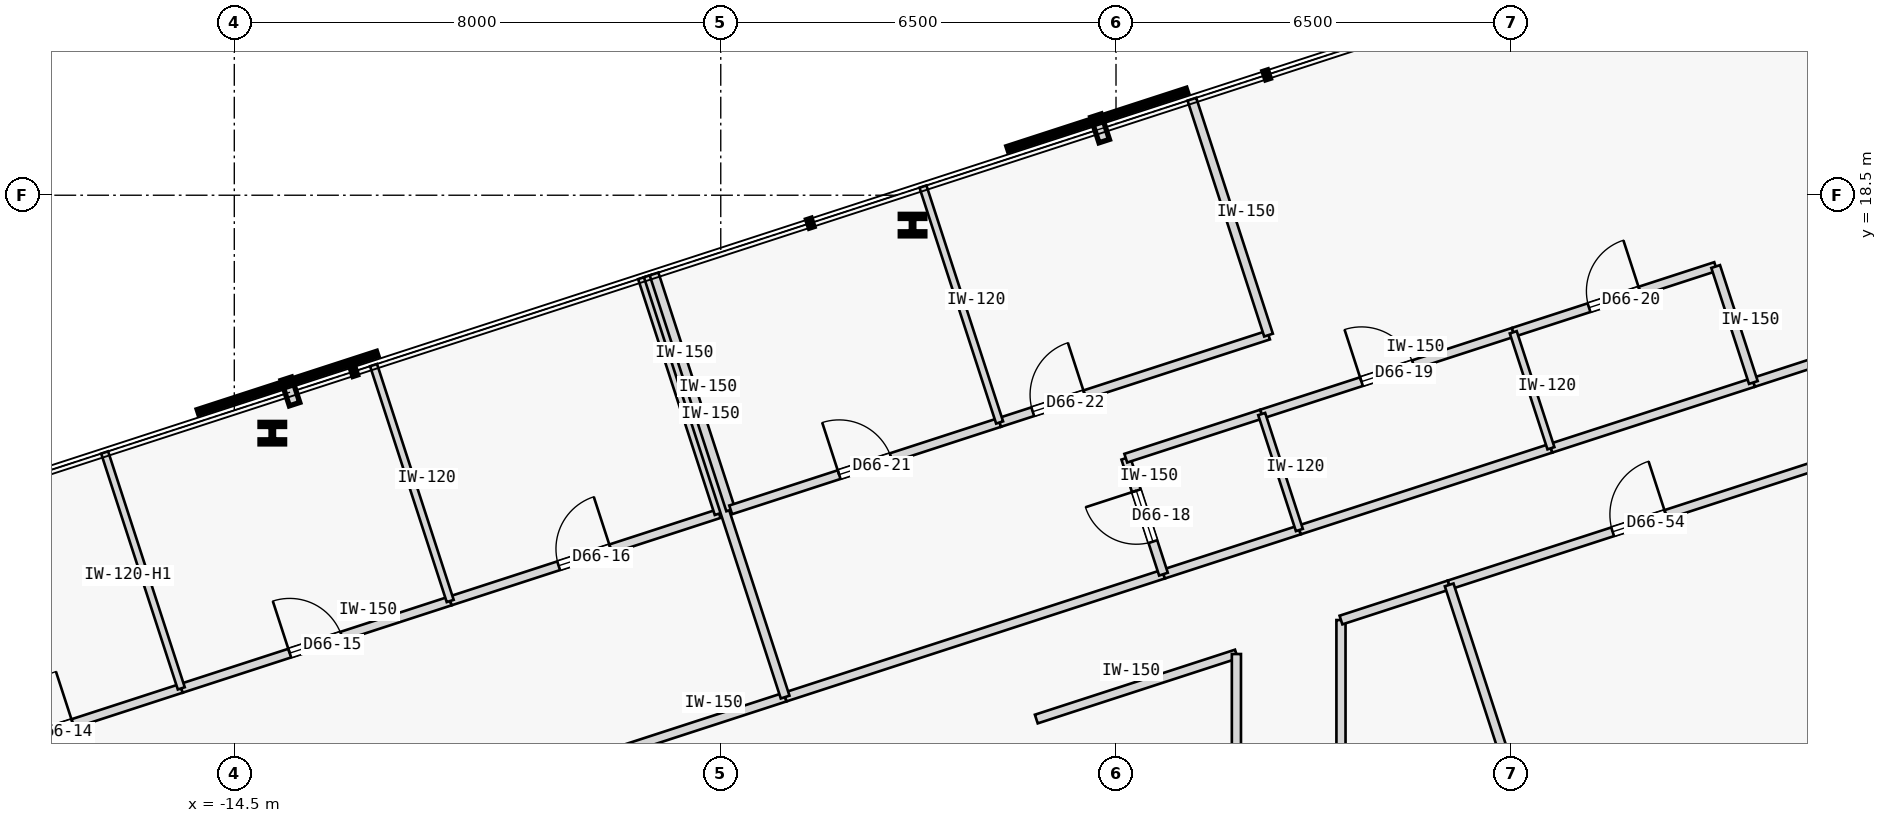
"""IFC4 building model, lengths in metres.
Left out: names, types, materials, properties, quantities, classifications, styles, units other than length and angle.
Written with IfcOpenShell. Run it as: python <this file> out.ifc"""

import sys

from ifc_helpers import new_model, si_unit, direction, frame, frame_2d, origin, origin_2d, place, context, subcontext, project, spatial, rectangle, i_section, extrude, element, fill, save


model = new_model("IFC4")
c1 = context("Model", 3, precision=1e-05, world=origin(), true_north=direction((0.0, 1.0)))
c2 = subcontext(c1, "Body", "Model", "MODEL_VIEW")
j1 = project(units=[si_unit("LENGTHUNIT", "METRE"), si_unit("PLANEANGLEUNIT", "RADIAN")], contexts=[c1])
p1 = place(None, origin())
s1 = spatial("IfcSite", under=j1, at=p1, CompositionType="ELEMENT")
p2 = place(p1, origin())
s2 = spatial("IfcBuilding", under=s1, at=p2, CompositionType="ELEMENT")
p3 = place(p2, frame((0.0, 0.0, 247.75)))
s3 = spatial("IfcBuildingStorey", under=s2, at=p3, CompositionType="ELEMENT", Elevation=247.75)
for number, where, z_axis, x_axis in (
    (1, (-3.346, 18.009, 0.0), (0.0, 0.0, 1.0), (1.0, 0.0, 0.0)),
    (2, (-13.875, 14.587, 0.0), (0.0, 0.0, 1.0), (1.0, 0.0, 0.0)),
):
    element("IfcColumn", number, at=place(p3, frame(where, z_axis=z_axis, x_axis=x_axis)), inside=s3, PredefinedType="COLUMN", context=c2, shape_type="SweptSolid", body=[
        extrude(i_section(OverallWidth=0.405, OverallDepth=0.355, WebThickness=0.042, FlangeThickness=0.068, FilletRadius=0.015, at=origin_2d()), origin(), (0.0, 0.0, 1.0), 3.35),
    ])
p4 = place(p3, frame((-19.497, 5.68, 0.0), z_axis=(0.0, 0.0, 1.0), x_axis=(0.95105300492, 0.309027801067, 0.0)))
e3 = element("IfcWall", 3, at=p4, inside=s3, PredefinedType="PARTITIONING", context=c2, shape_type="SweptSolid", body=[
    extrude(rectangle(XDim=14.779, YDim=0.15, at=frame_2d((7.39, 0.0))), origin(), (0.0, 0.0, 1.0), 3.125),
])
p5 = place(p4, frame((6.915, 0.0, 0.0)))
e4 = element("IfcOpeningElement", 4, at=p5, cuts=e3, PredefinedType="OPENING", context=c2, shape_type="SweptSolid", body=[
    extrude(rectangle(XDim=0.95, YDim=2.15, at=frame_2d((0.475, 1.075))), frame((0.0, 0.085, 0.0), z_axis=(0.0, -1.0, 0.0), x_axis=(1.0, 0.0, 0.0)), (0.0, 0.0, 1.0), 0.17),
])
p6 = place(p3, frame((-5.441, 10.247, 0.0), z_axis=(0.0, 0.0, 1.0), x_axis=(0.951062860421, 0.308997468483, 0.0)))
e5 = element("IfcWall", 5, at=p6, inside=s3, PredefinedType="PARTITIONING", context=c2, shape_type="SweptSolid", body=[
    extrude(rectangle(XDim=6.542, YDim=0.15, at=frame_2d((3.271, 0.0))), origin(), (0.0, 0.0, 1.0), 3.125),
])
p7 = place(p3, frame((10.481, 15.421, 0.0), z_axis=(0.0, 0.0, 1.0), x_axis=(0.951055682471, 0.30901956061, 0.0)))
e6 = element("IfcWall", 6, at=p7, inside=s3, PredefinedType="PARTITIONING", context=c2, shape_type="SweptSolid", body=[
    extrude(rectangle(XDim=13.114, YDim=0.15, at=frame_2d((6.557, 0.0))), origin(), (0.0, 0.0, 1.0), 3.125),
])
p8 = place(p7, frame((6.082, 0.0, 0.0)))
e7 = element("IfcOpeningElement", 7, at=p8, cuts=e6, PredefinedType="OPENING", context=c2, shape_type="SweptSolid", body=[
    extrude(rectangle(XDim=0.95, YDim=2.15, at=frame_2d((0.475, 1.075))), frame((0.0, 0.085, 0.0), z_axis=(0.0, -1.0, 0.0), x_axis=(1.0, 0.0, 0.0)), (0.0, 0.0, 1.0), 0.17),
])
p9 = place(p3, frame((0.781, 12.269, 0.0), z_axis=(0.0, 0.0, 1.0), x_axis=(0.951066131077, 0.308987401554, 0.0)))
e8 = element("IfcWall", 8, at=p9, inside=s3, PredefinedType="PARTITIONING", context=c2, shape_type="SweptSolid", body=[
    extrude(rectangle(XDim=2.35, YDim=0.15, at=frame_2d((1.175, 0.0))), origin(), (0.0, 0.0, 1.0), 3.125),
])
p10 = place(p3, frame((3.015, 12.995, 0.0), z_axis=(0.0, 0.0, 1.0), x_axis=(0.951052627573, 0.309028962374, 0.0)))
e9 = element("IfcWall", 9, at=p10, inside=s3, PredefinedType="PARTITIONING", context=c2, shape_type="SweptSolid", body=[
    extrude(rectangle(XDim=4.35, YDim=0.15, at=frame_2d((2.175, 0.0))), origin(), (0.0, 0.0, 1.0), 3.125),
])
p11 = place(p3, frame((7.152, 14.339, 0.0), z_axis=(0.0, 0.0, 1.0), x_axis=(0.951062257173, 0.308999325213, 0.0)))
e10 = element("IfcWall", 10, at=p11, inside=s3, PredefinedType="PARTITIONING", context=c2, shape_type="SweptSolid", body=[
    extrude(rectangle(XDim=3.5, YDim=0.15, at=frame_2d((1.75, 0.0))), origin(), (0.0, 0.0, 1.0), 3.125),
])
p12 = place(p3, frame((3.7, 5.6, 0.0), z_axis=(0.0, 0.0, 1.0), x_axis=(-0.000123839008, 0.999999992332, 0.0)))
e11 = element("IfcWall", 11, at=p12, inside=s3, PredefinedType="PARTITIONING", context=c2, shape_type="SweptSolid", body=[
    extrude(rectangle(XDim=5.914, YDim=0.15, at=frame_2d((2.957, 0.0))), origin(), (0.0, 0.0, 1.0), 2.675),
])
p13 = place(p12, frame((2.497, 0.0, 0.0)))
e12 = element("IfcOpeningElement", 12, at=p13, cuts=e11, PredefinedType="OPENING", context=c2, shape_type="SweptSolid", body=[
    extrude(rectangle(XDim=0.92, YDim=2.15, at=frame_2d((0.46, 1.075))), frame((0.0, 0.085, 0.0), z_axis=(0.0, -1.0, 0.0), x_axis=(1.0, 0.0, 0.0)), (0.0, 0.0, 1.0), 0.17),
])
p14 = place(p3, frame((3.699, 11.514, 0.0), z_axis=(0.0, 0.0, 1.0), x_axis=(0.951069540665, 0.308976906612, 0.0)))
e13 = element("IfcWall", 13, at=p14, inside=s3, PredefinedType="PARTITIONING", context=c2, shape_type="SweptSolid", body=[
    extrude(rectangle(XDim=1.871, YDim=0.15, at=frame_2d((0.936, 0.0))), origin(), (0.0, 0.0, 1.0), 3.125),
])
p15 = place(p3, frame((5.479, 12.092, 0.0), z_axis=(0.0, 0.0, 1.0), x_axis=(0.951051809397, 0.309031480343, 0.0)))
e14 = element("IfcWall", 14, at=p15, inside=s3, PredefinedType="PARTITIONING", context=c2, shape_type="SweptSolid", body=[
    extrude(rectangle(XDim=6.573, YDim=0.15, at=frame_2d((3.287, 0.0))), origin(), (0.0, 0.0, 1.0), 3.125),
])
p16 = place(p15, frame((2.826, 0.0, 0.0)))
e15 = element("IfcOpeningElement", 15, at=p16, cuts=e14, PredefinedType="OPENING", context=c2, shape_type="SweptSolid", body=[
    extrude(rectangle(XDim=0.92, YDim=2.15, at=frame_2d((0.46, 1.075))), frame((0.0, 0.085, 0.0), z_axis=(0.0, -1.0, 0.0), x_axis=(1.0, 0.0, 0.0)), (0.0, 0.0, 1.0), 0.17),
])
p17 = place(p3, frame((-1.311, 9.886, 0.0), z_axis=(0.0, 0.0, 1.0), x_axis=(0.951068803905, 0.308979174442, 0.0)))
e16 = element("IfcWall", 16, at=p17, inside=s3, PredefinedType="PARTITIONING", context=c2, shape_type="SweptSolid", body=[
    extrude(rectangle(XDim=3.46, YDim=0.15, at=frame_2d((1.73, 0.0))), origin(), (0.0, 0.0, 1.0), 3.125),
])
p18 = place(p3, frame((1.98, 6.748, 0.0), z_axis=(0.0, 0.0, 1.0), x_axis=(0.0, 1.0, 0.0)))
e17 = element("IfcWall", 17, at=p18, inside=s3, PredefinedType="PARTITIONING", context=c2, shape_type="SweptSolid", body=[
    extrude(rectangle(XDim=4.207, YDim=0.15, at=frame_2d((2.104, 0.0))), origin(), (0.0, 0.0, 1.0), 2.675),
])
p19 = place(p18, frame((1.643, 0.0, 0.0)))
e18 = element("IfcOpeningElement", 18, at=p19, cuts=e17, PredefinedType="OPENING", context=c2, shape_type="SweptSolid", body=[
    extrude(rectangle(XDim=0.92, YDim=2.15, at=frame_2d((0.46, 1.075))), frame((0.0, 0.085, 0.0), z_axis=(0.0, -1.0, 0.0), x_axis=(1.0, 0.0, 0.0)), (0.0, 0.0, 1.0), 0.17),
])
p20 = place(p3, frame((-19.794, 8.954, 0.0), z_axis=(0.0, 0.0, 1.0), x_axis=(0.951065702951, 0.308988719326, 0.0)))
e19 = element("IfcWall", 19, at=p20, inside=s3, PredefinedType="PARTITIONING", context=c2, shape_type="SweptSolid", body=[
    extrude(rectangle(XDim=4.65, YDim=0.15, at=frame_2d((2.325, 0.0))), origin(), (0.0, 0.0, 1.0), 3.125),
])
p21 = place(p20, frame((1.875, 0.0, 0.0)))
e20 = element("IfcOpeningElement", 20, at=p21, cuts=e19, PredefinedType="OPENING", context=c2, shape_type="SweptSolid", body=[
    extrude(rectangle(XDim=0.9, YDim=2.15, at=frame_2d((0.45, 1.075))), frame((0.0, 0.085, 0.0), z_axis=(0.0, -1.0, 0.0), x_axis=(1.0, 0.0, 0.0)), (0.0, 0.0, 1.0), 0.17),
])
p22 = place(p3, frame((-15.372, 10.39, 0.0), z_axis=(0.0, 0.0, 1.0), x_axis=(0.951050272606, 0.309036209813, 0.0)))
e21 = element("IfcWall", 21, at=p22, inside=s3, PredefinedType="PARTITIONING", context=c2, shape_type="SweptSolid", body=[
    extrude(rectangle(XDim=4.65, YDim=0.15, at=frame_2d((2.325, 0.0))), origin(), (0.0, 0.0, 1.0), 3.125),
])
p23 = place(p22, frame((1.875, 0.0, 0.0)))
e22 = element("IfcOpeningElement", 22, at=p23, cuts=e21, PredefinedType="OPENING", context=c2, shape_type="SweptSolid", body=[
    extrude(rectangle(XDim=0.9, YDim=2.15, at=frame_2d((0.45, 1.075))), frame((0.0, 0.085, 0.0), z_axis=(0.0, -1.0, 0.0), x_axis=(1.0, 0.0, 0.0)), (0.0, 0.0, 1.0), 0.17),
])
p24 = place(p3, frame((-10.949, 11.827, 0.0), z_axis=(0.0, 0.0, 1.0), x_axis=(0.951050272606, 0.309036209813, 0.0)))
e23 = element("IfcWall", 23, at=p24, inside=s3, PredefinedType="PARTITIONING", context=c2, shape_type="SweptSolid", body=[
    extrude(rectangle(XDim=4.65, YDim=0.15, at=frame_2d((2.325, 0.0))), origin(), (0.0, 0.0, 1.0), 3.125),
])
p25 = place(p24, frame((1.875, 0.0, 0.0)))
e24 = element("IfcOpeningElement", 24, at=p25, cuts=e23, PredefinedType="OPENING", context=c2, shape_type="SweptSolid", body=[
    extrude(rectangle(XDim=0.9, YDim=2.15, at=frame_2d((0.45, 1.075))), frame((0.0, 0.085, 0.0), z_axis=(0.0, -1.0, 0.0), x_axis=(1.0, 0.0, 0.0)), (0.0, 0.0, 1.0), 0.17),
])
p26 = place(p3, frame((-6.527, 13.264, 0.0), z_axis=(0.0, 0.0, 1.0), x_axis=(-0.308964264858, 0.951073647538, 0.0)))
e25 = element("IfcWall", 25, at=p26, inside=s3, PredefinedType="PARTITIONING", context=c2, shape_type="SweptSolid", body=[
    extrude(rectangle(XDim=4.079, YDim=0.15, at=frame_2d((2.04, 0.0))), origin(), (0.0, 0.0, 1.0), 3.125),
])
p27 = place(p3, frame((-5.441, 10.247, 0.0), z_axis=(0.0, 0.0, 1.0), x_axis=(-0.309039081864, 0.951049339351, 0.0)))
e26 = element("IfcWall", 26, at=p27, inside=s3, PredefinedType="PARTITIONING", context=c2, shape_type="SweptSolid", body=[
    extrude(rectangle(XDim=7.284, YDim=0.15, at=frame_2d((3.642, 0.0))), origin(), (0.0, 0.0, 1.0), 3.125),
])
p28 = place(p3, frame((-15.372, 10.39, 0.0), z_axis=(0.0, 0.0, 1.0), x_axis=(-0.309000814064, 0.951061773445, 0.0)))
e27 = element("IfcWall", 27, at=p28, inside=s3, PredefinedType="PARTITIONING", context=c2, shape_type="SweptSolid", body=[
    extrude(rectangle(XDim=4.079, YDim=0.12, at=frame_2d((2.04, 0.0))), origin(), (0.0, 0.0, 1.0), 2.675),
])
p29 = place(p3, frame((-10.949, 11.827, 0.0), z_axis=(0.0, 0.0, 1.0), x_axis=(-0.308964264858, 0.951073647538, 0.0)))
e28 = element("IfcWall", 28, at=p29, inside=s3, PredefinedType="PARTITIONING", context=c2, shape_type="SweptSolid", body=[
    extrude(rectangle(XDim=4.079, YDim=0.12, at=frame_2d((2.04, 0.0))), origin(), (0.0, 0.0, 1.0), 3.125),
])
p30 = place(p3, frame((0.781, 12.269, 0.0), z_axis=(0.0, 0.0, 1.0), x_axis=(-0.309058537449, 0.951043017129, 0.0)))
e29 = element("IfcWall", 29, at=p30, inside=s3, PredefinedType="PARTITIONING", context=c2, shape_type="SweptSolid", body=[
    extrude(rectangle(XDim=2.005, YDim=0.15, at=frame_2d((1.002, 0.0))), origin(), (0.0, 0.0, 1.0), 3.125),
])
p31 = place(p30, frame((0.562, 0.0, 0.0)))
e30 = element("IfcOpeningElement", 30, at=p31, cuts=e29, PredefinedType="OPENING", context=c2, shape_type="SweptSolid", body=[
    extrude(rectangle(XDim=0.88, YDim=2.15, at=frame_2d((0.44, 1.075))), frame((0.0, 0.085, 0.0), z_axis=(0.0, -1.0, 0.0), x_axis=(1.0, 0.0, 0.0)), (0.0, 0.0, 1.0), 0.17),
])
p32 = place(p3, frame((0.161, 14.176, 0.0), z_axis=(0.0, 0.0, 1.0), x_axis=(0.951035595692, 0.309081373955, 0.0)))
e31 = element("IfcWall", 31, at=p32, inside=s3, PredefinedType="PARTITIONING", context=c2, shape_type="SweptSolid", body=[
    extrude(rectangle(XDim=2.35, YDim=0.15, at=frame_2d((1.175, 0.0))), origin(), (0.0, 0.0, 1.0), 3.125),
])
p33 = place(p3, frame((2.396, 14.902, 0.0), z_axis=(0.0, 0.0, 1.0), x_axis=(0.951057987102, 0.309012467661, 0.0)))
e32 = element("IfcWall", 32, at=p33, inside=s3, PredefinedType="PARTITIONING", context=c2, shape_type="SweptSolid", body=[
    extrude(rectangle(XDim=4.35, YDim=0.15, at=frame_2d((2.175, 0.0))), origin(), (0.0, 0.0, 1.0), 3.125),
])
p34 = place(p33, frame((1.725, 0.0, 0.0)))
e33 = element("IfcOpeningElement", 33, at=p34, cuts=e32, PredefinedType="OPENING", context=c2, shape_type="SweptSolid", body=[
    extrude(rectangle(XDim=0.9, YDim=2.15, at=frame_2d((0.45, 1.075))), frame((0.0, 0.085, 0.0), z_axis=(0.0, -1.0, 0.0), x_axis=(1.0, 0.0, 0.0)), (0.0, 0.0, 1.0), 0.17),
])
p35 = place(p3, frame((6.533, 16.246, 0.0), z_axis=(0.0, 0.0, 1.0), x_axis=(0.951055596592, 0.309019824916, 0.0)))
e34 = element("IfcWall", 34, at=p35, inside=s3, PredefinedType="PARTITIONING", context=c2, shape_type="SweptSolid", body=[
    extrude(rectangle(XDim=3.5, YDim=0.15, at=frame_2d((1.75, 0.0))), origin(), (0.0, 0.0, 1.0), 3.125),
])
p36 = place(p35, frame((1.31, 0.0, 0.0)))
e35 = element("IfcOpeningElement", 35, at=p36, cuts=e34, PredefinedType="OPENING", context=c2, shape_type="SweptSolid", body=[
    extrude(rectangle(XDim=0.88, YDim=2.15, at=frame_2d((0.44, 1.075))), frame((0.0, 0.085, 0.0), z_axis=(0.0, -1.0, 0.0), x_axis=(1.0, 0.0, 0.0)), (0.0, 0.0, 1.0), 0.17),
])
p37 = place(p3, frame((10.481, 15.421, 0.0), z_axis=(0.0, 0.0, 1.0), x_axis=(-0.309022749039, 0.951054646472, 0.0)))
e36 = element("IfcWall", 36, at=p37, inside=s3, PredefinedType="PARTITIONING", context=c2, shape_type="SweptSolid", body=[
    extrude(rectangle(XDim=2.005, YDim=0.15, at=frame_2d((1.002, 0.0))), origin(), (0.0, 0.0, 1.0), 3.125),
])
p38 = place(p3, frame((-6.337, 13.326, 0.0), z_axis=(0.0, 0.0, 1.0), x_axis=(-0.309018403393, 0.951056058476, 0.0)))
e37 = element("IfcWall", 37, at=p38, inside=s3, PredefinedType="PARTITIONING", context=c2, shape_type="SweptSolid", body=[
    extrude(rectangle(XDim=4.079, YDim=0.15, at=frame_2d((2.04, 0.0))), origin(), (0.0, 0.0, 1.0), 3.125),
])
p39 = place(p3, frame((-6.337, 13.326, 0.0), z_axis=(0.0, 0.0, 1.0), x_axis=(0.951050272606, 0.309036209813, 0.0)))
e38 = element("IfcWall", 38, at=p39, inside=s3, PredefinedType="PARTITIONING", context=c2, shape_type="SweptSolid", body=[
    extrude(rectangle(XDim=4.65, YDim=0.15, at=frame_2d((2.325, 0.0))), origin(), (0.0, 0.0, 1.0), 3.125),
])
p40 = place(p39, frame((1.875, 0.0, 0.0)))
e39 = element("IfcOpeningElement", 39, at=p40, cuts=e38, PredefinedType="OPENING", context=c2, shape_type="SweptSolid", body=[
    extrude(rectangle(XDim=0.9, YDim=2.15, at=frame_2d((0.45, 1.075))), frame((0.0, 0.085, 0.0), z_axis=(0.0, -1.0, 0.0), x_axis=(1.0, 0.0, 0.0)), (0.0, 0.0, 1.0), 0.17),
])
p41 = place(p3, frame((-1.914, 14.763, 0.0), z_axis=(0.0, 0.0, 1.0), x_axis=(0.951065702951, 0.308988719326, 0.0)))
e40 = element("IfcWall", 40, at=p41, inside=s3, PredefinedType="PARTITIONING", context=c2, shape_type="SweptSolid", body=[
    extrude(rectangle(XDim=4.65, YDim=0.15, at=frame_2d((2.325, 0.0))), origin(), (0.0, 0.0, 1.0), 3.125),
])
p42 = place(p41, frame((0.573, 0.0, 0.0)))
e41 = element("IfcOpeningElement", 41, at=p42, cuts=e40, PredefinedType="OPENING", context=c2, shape_type="SweptSolid", body=[
    extrude(rectangle(XDim=0.9, YDim=2.15, at=frame_2d((0.45, 1.075))), frame((0.0, 0.085, 0.0), z_axis=(0.0, -1.0, 0.0), x_axis=(1.0, 0.0, 0.0)), (0.0, 0.0, 1.0), 0.17),
])
p43 = place(p3, frame((2.508, 16.2, 0.0), z_axis=(0.0, 0.0, 1.0), x_axis=(-0.309018403393, 0.951056058476, 0.0)))
e42 = element("IfcWall", 42, at=p43, inside=s3, PredefinedType="PARTITIONING", context=c2, shape_type="SweptSolid", body=[
    extrude(rectangle(XDim=4.079, YDim=0.15, at=frame_2d((2.04, 0.0))), origin(), (0.0, 0.0, 1.0), 3.125),
])
for number, where, z_axis, x_axis in (
    (43, (3.015, 12.995, 0.0), (0.0, 0.0, 1.0), (-0.309, 0.951, 0.0)),
    (44, (7.152, 14.339, 0.0), (0.0, 0.0, 1.0), (-0.309, 0.951, 0.0)),
):
    element("IfcWall", number, at=place(p3, frame(where, z_axis=z_axis, x_axis=x_axis)), inside=s3, PredefinedType="PARTITIONING", context=c2, shape_type="SweptSolid", body=[
        extrude(rectangle(XDim=2.005, YDim=0.12, at=frame_2d((1.002, 0.0))), origin(), (0.0, 0.0, 1.0), 3.125),
    ])
p44 = place(p3, frame((-1.914, 14.763, 0.0), z_axis=(0.0, 0.0, 1.0), x_axis=(-0.309018403393, 0.951056058476, 0.0)))
e45 = element("IfcWall", 45, at=p44, inside=s3, PredefinedType="PARTITIONING", context=c2, shape_type="SweptSolid", body=[
    extrude(rectangle(XDim=4.079, YDim=0.12, at=frame_2d((2.04, 0.0))), origin(), (0.0, 0.0, 1.0), 3.125),
])
p45 = place(p3, frame((7.588, 5.6, 0.0), z_axis=(0.0, 0.0, 1.0), x_axis=(-0.309018946982, 0.951055881852, 0.0)))
e46 = element("IfcWall", 46, at=p45, inside=s3, PredefinedType="PARTITIONING", context=c2, shape_type="SweptSolid", body=[
    extrude(rectangle(XDim=6.826, YDim=0.15, at=frame_2d((3.413, 0.0))), origin(), (0.0, 0.0, 1.0), 3.125),
])
p46 = place(p21, origin())
e47 = element("IfcDoor", 47, at=p46, inside=s3, OperationType="SINGLE_SWING_RIGHT", PredefinedType="DOOR", context=c2, shape_type="SweptSolid", body=[
    extrude(rectangle(XDim=0.9, YDim=2.15, at=frame_2d((0.45, 1.075))), frame((0.0, 0.025, 0.0), z_axis=(0.0, -1.0, 0.0), x_axis=(1.0, 0.0, 0.0)), (0.0, 0.0, 1.0), 0.05),
])
fill(e20, e47)
p47 = place(p23, origin())
e48 = element("IfcDoor", 48, at=p47, inside=s3, OperationType="SINGLE_SWING_LEFT", PredefinedType="DOOR", context=c2, shape_type="SweptSolid", body=[
    extrude(rectangle(XDim=0.9, YDim=2.15, at=frame_2d((0.45, 1.075))), frame((0.0, 0.025, 0.0), z_axis=(0.0, -1.0, 0.0), x_axis=(1.0, 0.0, 0.0)), (0.0, 0.0, 1.0), 0.05),
])
fill(e22, e48)
p48 = place(p25, origin())
e49 = element("IfcDoor", 49, at=p48, inside=s3, OperationType="SINGLE_SWING_RIGHT", PredefinedType="DOOR", context=c2, shape_type="SweptSolid", body=[
    extrude(rectangle(XDim=0.9, YDim=2.15, at=frame_2d((0.45, 1.075))), frame((0.0, 0.025, 0.0), z_axis=(0.0, -1.0, 0.0), x_axis=(1.0, 0.0, 0.0)), (0.0, 0.0, 1.0), 0.05),
])
fill(e24, e49)
p49 = place(p31, origin())
e50 = element("IfcDoor", 50, at=p49, inside=s3, OperationType="SINGLE_SWING_RIGHT", PredefinedType="DOOR", context=c2, shape_type="SweptSolid", body=[
    extrude(rectangle(XDim=0.88, YDim=2.15, at=frame_2d((0.44, 1.075))), frame((0.0, 0.025, 0.0), z_axis=(0.0, -1.0, 0.0), x_axis=(1.0, 0.0, 0.0)), (0.0, 0.0, 1.0), 0.05),
])
fill(e30, e50)
p50 = place(p34, origin())
e51 = element("IfcDoor", 51, at=p50, inside=s3, OperationType="SINGLE_SWING_LEFT", PredefinedType="DOOR", context=c2, shape_type="SweptSolid", body=[
    extrude(rectangle(XDim=0.9, YDim=2.15, at=frame_2d((0.45, 1.075))), frame((0.0, 0.025, 0.0), z_axis=(0.0, -1.0, 0.0), x_axis=(1.0, 0.0, 0.0)), (0.0, 0.0, 1.0), 0.05),
])
fill(e33, e51)
p51 = place(p36, origin())
e52 = element("IfcDoor", 52, at=p51, inside=s3, OperationType="SINGLE_SWING_RIGHT", PredefinedType="DOOR", context=c2, shape_type="SweptSolid", body=[
    extrude(rectangle(XDim=0.88, YDim=2.15, at=frame_2d((0.44, 1.075))), frame((0.0, 0.025, 0.0), z_axis=(0.0, -1.0, 0.0), x_axis=(1.0, 0.0, 0.0)), (0.0, 0.0, 1.0), 0.05),
])
fill(e35, e52)
p52 = place(p40, origin())
e53 = element("IfcDoor", 53, at=p52, inside=s3, OperationType="SINGLE_SWING_LEFT", PredefinedType="DOOR", context=c2, shape_type="SweptSolid", body=[
    extrude(rectangle(XDim=0.9, YDim=2.15, at=frame_2d((0.45, 1.075))), frame((0.0, 0.025, 0.0), z_axis=(0.0, -1.0, 0.0), x_axis=(1.0, 0.0, 0.0)), (0.0, 0.0, 1.0), 0.05),
])
fill(e39, e53)
p53 = place(p42, origin())
e54 = element("IfcDoor", 54, at=p53, inside=s3, OperationType="SINGLE_SWING_RIGHT", PredefinedType="DOOR", context=c2, shape_type="SweptSolid", body=[
    extrude(rectangle(XDim=0.9, YDim=2.15, at=frame_2d((0.45, 1.075))), frame((0.0, 0.025, 0.0), z_axis=(0.0, -1.0, 0.0), x_axis=(1.0, 0.0, 0.0)), (0.0, 0.0, 1.0), 0.05),
])
fill(e41, e54)
p54 = place(p16, origin())
e55 = element("IfcDoor", 55, at=p54, inside=s3, OperationType="SINGLE_SWING_RIGHT", PredefinedType="DOOR", context=c2, shape_type="SweptSolid", body=[
    extrude(rectangle(XDim=0.92, YDim=2.15, at=frame_2d((0.46, 1.075))), frame((0.0, 0.025, 0.0), z_axis=(0.0, -1.0, 0.0), x_axis=(1.0, 0.0, 0.0)), (0.0, 0.0, 1.0), 0.05),
])
fill(e15, e55)
save(model, sys.argv[1])
